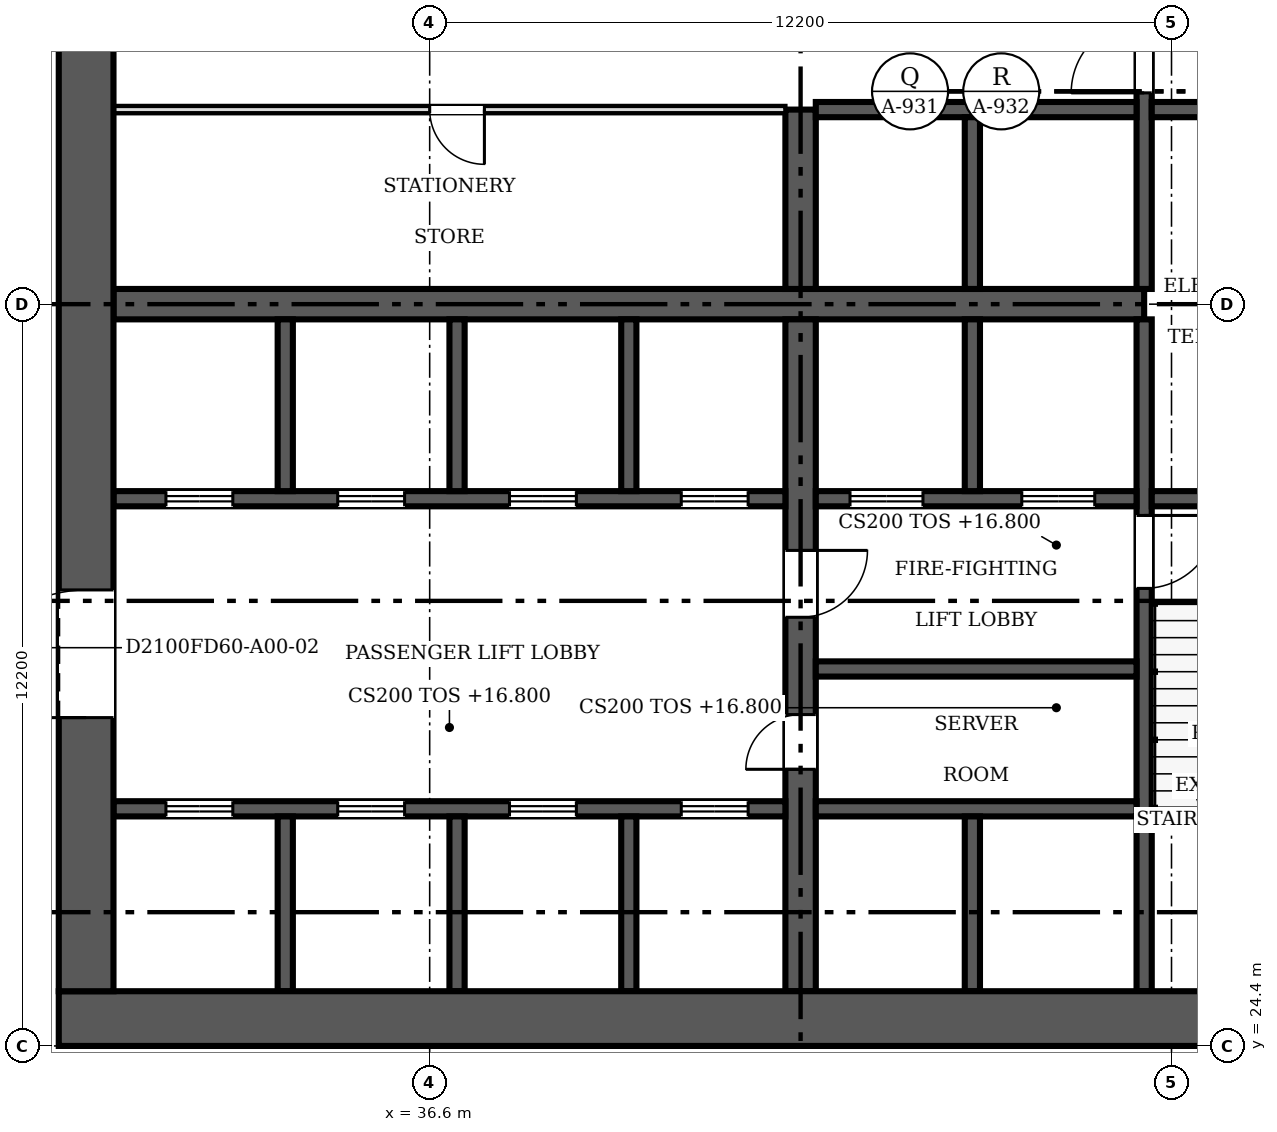
"""IFC4 building model, lengths in metres.
Left out: names, types, materials, properties, quantities, classifications, styles, units other than length and angle.
Written with IfcOpenShell. Run it as: python <this file> out.ifc"""

import sys

from ifc_helpers import new_model, si_unit, direction, frame, frame_2d, origin, place, context, subcontext, project, spatial, rectangle, extrude, source, transform, mapped, element, fill, save


model = new_model("IFC4")
c1 = context("Model", 3, precision=1e-05, world=origin(), true_north=direction((0.0, 1.0)))
c2 = subcontext(c1, "Body", "Model", "MODEL_VIEW")
j1 = project(units=[si_unit("LENGTHUNIT", "METRE"), si_unit("PLANEANGLEUNIT", "RADIAN")], contexts=[c1])
p1 = place(None, origin())
s1 = spatial("IfcSite", under=j1, at=p1, CompositionType="ELEMENT")
p2 = place(p1, origin())
s2 = spatial("IfcBuilding", under=s1, at=p2, CompositionType="ELEMENT")
p3 = place(p2, frame((0.0, 0.0, 16.8)))
s3 = spatial("IfcBuildingStorey", under=s2, at=p3, CompositionType="ELEMENT", Elevation=16.8)
p4 = place(p3, frame((54.9, 24.85, 0.0), z_axis=(0.0, 0.0, 1.0), x_axis=(-1.0, 0.0, 0.0)))
e1 = element("IfcWall", 1, at=p4, inside=s3, PredefinedType="SHEAR", context=c2, shape_type="SweptSolid", body=[
    extrude(rectangle(XDim=24.4, YDim=0.9, at=frame_2d((12.2, 0.0))), origin(), (0.0, 0.0, 1.0), 4.5),
])
m1 = source(origin(), c2, "Body", "SweptSolid", [
    extrude(rectangle(XDim=1.2, YDim=2.1, at=frame_2d((0.6, 1.05))), frame((0.0, 0.46, 0.0), z_axis=(0.0, -1.0, 0.0), x_axis=(1.0, 0.0, 0.0)), (0.0, 0.0, 1.0), 0.92),
])
p5 = place(p4, frame((1.5, 0.0, 0.0)))
e2 = element("IfcOpeningElement", 2, at=p5, cuts=e1, PredefinedType="OPENING", context=c2, shape_type="MappedRepresentation", body=[
    mapped(m1, transform((0.0, 0.0, 0.0), scale=1.0)),
])
p6 = place(p3, frame((30.95, 25.3, 0.0), z_axis=(0.0, 0.0, 1.0), x_axis=(0.0, 1.0, 0.0)))
e3 = element("IfcWall", 3, at=p6, inside=s3, PredefinedType="SHEAR", context=c2, shape_type="SweptSolid", body=[
    extrude(rectangle(XDim=22.6, YDim=0.9, at=frame_2d((11.3, 0.0))), origin(), (0.0, 0.0, 1.0), 4.5),
])
m2 = source(origin(), c2, "Body", "SweptSolid", [
    extrude(rectangle(XDim=2.1, YDim=2.4, at=frame_2d((1.05, 1.2))), frame((0.0, 0.46, 0.0), z_axis=(0.0, -1.0, 0.0), x_axis=(1.0, 0.0, 0.0)), (0.0, 0.0, 1.0), 0.92),
])
p7 = place(p6, frame((4.5, 0.0, 0.0)))
e4 = element("IfcOpeningElement", 4, at=p7, cuts=e3, PredefinedType="OPENING", context=c2, shape_type="MappedRepresentation", body=[
    mapped(m2, transform((0.0, 0.0, 0.0), scale=1.0)),
])
p8 = place(p6, frame((16.0, 0.0, 0.0)))
e5 = element("IfcOpeningElement", 5, at=p8, cuts=e3, PredefinedType="OPENING", context=c2, shape_type="MappedRepresentation", body=[
    mapped(m2, transform((0.0, 0.0, 0.0), scale=1.0)),
])
p9 = place(p3, frame((31.4, 36.6, 0.0), z_axis=(0.0, 0.0, 1.0), x_axis=(1.0, 0.0, 0.0)))
e6 = element("IfcWall", 6, at=p9, inside=s3, PredefinedType="SHEAR", context=c2, shape_type="SweptSolid", body=[
    extrude(rectangle(XDim=16.95, YDim=0.5, at=frame_2d((8.475, 0.0))), origin(), (0.0, 0.0, 1.0), 4.5),
])
p10 = place(p3, frame((42.7, 36.35, 0.0), z_axis=(0.0, 0.0, 1.0), x_axis=(0.0, -1.0, 0.0)))
e7 = element("IfcWall", 7, at=p10, inside=s3, PredefinedType="SHEAR", context=c2, shape_type="SweptSolid", body=[
    extrude(rectangle(XDim=11.05, YDim=0.5, at=frame_2d((5.525, 0.0))), origin(), (0.0, 0.0, 1.0), 4.5),
])
m3 = source(origin(), c2, "Body", "SweptSolid", [
    extrude(rectangle(XDim=0.9, YDim=2.1, at=frame_2d((0.45, 1.05))), frame((0.0, 0.26, 0.0), z_axis=(0.0, -1.0, 0.0), x_axis=(1.0, 0.0, 0.0)), (0.0, 0.0, 1.0), 0.52),
])
p11 = place(p10, frame((6.5, 0.0, 0.0)))
e8 = element("IfcOpeningElement", 8, at=p11, cuts=e7, PredefinedType="OPENING", context=c2, shape_type="MappedRepresentation", body=[
    mapped(m3, transform((0.0, 0.0, 0.0), scale=1.0)),
])
m4 = source(origin(), c2, "Body", "SweptSolid", [
    extrude(rectangle(XDim=1.1, YDim=2.1, at=frame_2d((0.55, 1.05))), frame((0.0, 0.26, 0.0), z_axis=(0.0, -1.0, 0.0), x_axis=(1.0, 0.0, 0.0)), (0.0, 0.0, 1.0), 0.52),
])
p12 = place(p10, frame((3.8, 0.0, 0.0)))
e9 = element("IfcOpeningElement", 9, at=p12, cuts=e7, PredefinedType="OPENING", context=c2, shape_type="MappedRepresentation", body=[
    mapped(m4, transform((0.0, 0.0, 0.0), scale=1.0)),
])
p13 = place(p3, frame((42.7, 36.85, 0.0), z_axis=(0.0, 0.0, 1.0), x_axis=(0.0, 1.0, 0.0)))
e10 = element("IfcWall", 10, at=p13, inside=s3, PredefinedType="SHEAR", context=c2, shape_type="SweptSolid", body=[
    extrude(rectangle(XDim=2.95, YDim=0.5, at=frame_2d((1.475, 0.0))), origin(), (0.0, 0.0, 1.0), 4.5),
])
p14 = place(p3, frame((48.35, 36.35, 0.0), z_axis=(0.0, 0.0, 1.0), x_axis=(0.0, -1.0, 0.0)))
e11 = element("IfcWall", 11, at=p14, inside=s3, PredefinedType="SOLIDWALL", context=c2, shape_type="SweptSolid", body=[
    extrude(rectangle(XDim=11.05, YDim=0.25, at=frame_2d((5.525, 0.0))), origin(), (0.0, 0.0, 1.0), 4.5),
])
m5 = source(origin(), c2, "Body", "SweptSolid", [
    extrude(rectangle(XDim=1.2, YDim=2.1, at=frame_2d((0.6, 1.05))), frame((0.0, 0.135, 0.0), z_axis=(0.0, -1.0, 0.0), x_axis=(1.0, 0.0, 0.0)), (0.0, 0.0, 1.0), 0.27),
])
p15 = place(p14, frame((3.225, 0.0, 0.0)))
e12 = element("IfcOpeningElement", 12, at=p15, cuts=e11, PredefinedType="OPENING", context=c2, shape_type="MappedRepresentation", body=[
    mapped(m5, transform((0.0, 0.0, 0.0), scale=1.0)),
])
p16 = place(p3, frame((48.35, 47.9, 0.0), z_axis=(0.0, 0.0, 1.0), x_axis=(0.0, -1.0, 0.0)))
e13 = element("IfcWall", 13, at=p16, inside=s3, PredefinedType="SOLIDWALL", context=c2, shape_type="SweptSolid", body=[
    extrude(rectangle(XDim=11.05, YDim=0.25, at=frame_2d((5.525, 0.0))), origin(), (0.0, 0.0, 1.0), 4.5),
])
p17 = place(p16, frame((6.625, 0.0, 0.0)))
e14 = element("IfcOpeningElement", 14, at=p17, cuts=e13, PredefinedType="OPENING", context=c2, shape_type="MappedRepresentation", body=[
    mapped(m5, transform((0.0, 0.0, 0.0), scale=1.0)),
])
p18 = place(p3, frame((42.45, 33.4, 0.0), z_axis=(0.0, 0.0, 1.0), x_axis=(-1.0, 0.0, 0.0)))
e15 = element("IfcWall", 15, at=p18, inside=s3, PredefinedType="SOLIDWALL", context=c2, shape_type="SweptSolid", body=[
    extrude(rectangle(XDim=11.05, YDim=0.25, at=frame_2d((5.525, 0.0))), origin(), (0.0, 0.0, 1.0), 4.5),
])
m6 = source(origin(), c2, "Body", "SweptSolid", [
    extrude(rectangle(XDim=1.1, YDim=2.1, at=frame_2d((0.55, 1.05))), frame((0.0, 0.135, 0.0), z_axis=(0.0, -1.0, 0.0), x_axis=(1.0, 0.0, 0.0)), (0.0, 0.0, 1.0), 0.27),
])
p19 = place(p18, frame((9.087, 0.0, 0.0)))
e16 = element("IfcOpeningElement", 16, at=p19, cuts=e15, PredefinedType="OPENING", context=c2, shape_type="MappedRepresentation", body=[
    mapped(m6, transform((0.0, 0.0, 0.0), scale=1.0)),
])
p20 = place(p18, frame((6.262, 0.0, 0.0)))
e17 = element("IfcOpeningElement", 17, at=p20, cuts=e15, PredefinedType="OPENING", context=c2, shape_type="MappedRepresentation", body=[
    mapped(m6, transform((0.0, 0.0, 0.0), scale=1.0)),
])
p21 = place(p18, frame((3.438, 0.0, 0.0)))
e18 = element("IfcOpeningElement", 18, at=p21, cuts=e15, PredefinedType="OPENING", context=c2, shape_type="MappedRepresentation", body=[
    mapped(m6, transform((0.0, 0.0, 0.0), scale=1.0)),
])
p22 = place(p18, frame((0.613, 0.0, 0.0)))
e19 = element("IfcOpeningElement", 19, at=p22, cuts=e15, PredefinedType="OPENING", context=c2, shape_type="MappedRepresentation", body=[
    mapped(m6, transform((0.0, 0.0, 0.0), scale=1.0)),
])
p23 = place(p3, frame((48.225, 33.4, 0.0), z_axis=(0.0, 0.0, 1.0), x_axis=(-1.0, 0.0, 0.0)))
e20 = element("IfcWall", 20, at=p23, inside=s3, PredefinedType="SOLIDWALL", context=c2, shape_type="SweptSolid", body=[
    extrude(rectangle(XDim=5.275, YDim=0.25, at=frame_2d((2.638, 0.0))), origin(), (0.0, 0.0, 1.0), 4.5),
])
p24 = place(p23, frame((3.512, 0.0, 0.0)))
e21 = element("IfcOpeningElement", 21, at=p24, cuts=e20, PredefinedType="OPENING", context=c2, shape_type="MappedRepresentation", body=[
    mapped(m5, transform((0.0, 0.0, 0.0), scale=1.0)),
])
p25 = place(p23, frame((0.688, 0.0, 0.0)))
e22 = element("IfcOpeningElement", 22, at=p25, cuts=e20, PredefinedType="OPENING", context=c2, shape_type="MappedRepresentation", body=[
    mapped(m5, transform((0.0, 0.0, 0.0), scale=1.0)),
])
p26 = place(p3, frame((48.475, 33.4, 0.0), z_axis=(0.0, 0.0, 1.0), x_axis=(1.0, 0.0, 0.0)))
e23 = element("IfcWall", 23, at=p26, inside=s3, PredefinedType="SOLIDWALL", context=c2, shape_type="SweptSolid", body=[
    extrude(rectangle(XDim=3.525, YDim=0.25, at=frame_2d((1.762, 0.0))), origin(), (0.0, 0.0, 1.0), 4.5),
])
p27 = place(p3, frame((31.4, 28.3, 0.0), z_axis=(0.0, 0.0, 1.0), x_axis=(1.0, 0.0, 0.0)))
e24 = element("IfcWall", 24, at=p27, inside=s3, PredefinedType="SOLIDWALL", context=c2, shape_type="SweptSolid", body=[
    extrude(rectangle(XDim=11.05, YDim=0.25, at=frame_2d((5.525, 0.0))), origin(), (0.0, 0.0, 1.0), 4.5),
])
p28 = place(p27, frame((0.863, 0.0, 0.0)))
e25 = element("IfcOpeningElement", 25, at=p28, cuts=e24, PredefinedType="OPENING", context=c2, shape_type="MappedRepresentation", body=[
    mapped(m6, transform((0.0, 0.0, 0.0), scale=1.0)),
])
p29 = place(p27, frame((3.688, 0.0, 0.0)))
e26 = element("IfcOpeningElement", 26, at=p29, cuts=e24, PredefinedType="OPENING", context=c2, shape_type="MappedRepresentation", body=[
    mapped(m6, transform((0.0, 0.0, 0.0), scale=1.0)),
])
p30 = place(p27, frame((6.512, 0.0, 0.0)))
e27 = element("IfcOpeningElement", 27, at=p30, cuts=e24, PredefinedType="OPENING", context=c2, shape_type="MappedRepresentation", body=[
    mapped(m6, transform((0.0, 0.0, 0.0), scale=1.0)),
])
p31 = place(p27, frame((9.337, 0.0, 0.0)))
e28 = element("IfcOpeningElement", 28, at=p31, cuts=e24, PredefinedType="OPENING", context=c2, shape_type="MappedRepresentation", body=[
    mapped(m6, transform((0.0, 0.0, 0.0), scale=1.0)),
])
for number, where, z_axis, x_axis in (
    (29, (42.95, 28.3, 0.0), (0.0, 0.0, 1.0), (1.0, 0.0, 0.0)),
    (30, (42.95, 39.8, 0.0), (0.0, 0.0, 1.0), (1.0, 0.0, 0.0)),
):
    element("IfcWall", number, at=place(p3, frame(where, z_axis=z_axis, x_axis=x_axis)), inside=s3, PredefinedType="SOLIDWALL", context=c2, shape_type="SweptSolid", body=[
        extrude(rectangle(XDim=5.275, YDim=0.25, at=frame_2d((2.638, 0.0))), origin(), (0.0, 0.0, 1.0), 4.5),
    ])
p32 = place(p3, frame((48.475, 39.8, 0.0), z_axis=(0.0, 0.0, 1.0), x_axis=(1.0, 0.0, 0.0)))
e31 = element("IfcWall", 31, at=p32, inside=s3, PredefinedType="SOLIDWALL", context=c2, shape_type="SweptSolid", body=[
    extrude(rectangle(XDim=3.525, YDim=0.25, at=frame_2d((1.762, 0.0))), origin(), (0.0, 0.0, 1.0), 4.5),
])
p33 = place(p3, frame((45.525, 33.525, 0.0), z_axis=(0.0, 0.0, 1.0), x_axis=(0.0, 1.0, 0.0)))
e32 = element("IfcWall", 32, at=p33, inside=s3, PredefinedType="SOLIDWALL", context=c2, shape_type="SweptSolid", body=[
    extrude(rectangle(XDim=2.825, YDim=0.25, at=frame_2d((1.413, 0.0))), origin(), (0.0, 0.0, 1.0), 4.5),
])
p34 = place(p3, frame((45.525, 36.85, 0.0), z_axis=(0.0, 0.0, 1.0), x_axis=(0.0, 1.0, 0.0)))
e33 = element("IfcWall", 33, at=p34, inside=s3, PredefinedType="SOLIDWALL", context=c2, shape_type="SweptSolid", body=[
    extrude(rectangle(XDim=2.825, YDim=0.25, at=frame_2d((1.413, 0.0))), origin(), (0.0, 0.0, 1.0), 4.5),
])
p35 = place(p3, frame((42.95, 30.6, 0.0), z_axis=(0.0, 0.0, 1.0), x_axis=(1.0, 0.0, 0.0)))
e34 = element("IfcWall", 34, at=p35, inside=s3, PredefinedType="SOLIDWALL", context=c2, shape_type="SweptSolid", body=[
    extrude(rectangle(XDim=5.275, YDim=0.25, at=frame_2d((2.638, 0.0))), origin(), (0.0, 0.0, 1.0), 4.5),
])
for number, where, z_axis, x_axis in (
    (35, (34.225, 33.525, 0.0), (0.0, 0.0, 1.0), (0.0, 1.0, 0.0)),
    (36, (37.05, 33.525, 0.0), (0.0, 0.0, 1.0), (0.0, 1.0, 0.0)),
    (37, (39.875, 33.525, 0.0), (0.0, 0.0, 1.0), (0.0, 1.0, 0.0)),
):
    element("IfcWall", number, at=place(p3, frame(where, z_axis=z_axis, x_axis=x_axis)), inside=s3, PredefinedType="SOLIDWALL", context=c2, shape_type="SweptSolid", body=[
        extrude(rectangle(XDim=2.825, YDim=0.25, at=frame_2d((1.413, 0.0))), origin(), (0.0, 0.0, 1.0), 4.5),
    ])
for number, where, z_axis, x_axis in (
    (38, (34.225, 25.3, 0.0), (0.0, 0.0, 1.0), (0.0, 1.0, 0.0)),
    (39, (37.05, 25.3, 0.0), (0.0, 0.0, 1.0), (0.0, 1.0, 0.0)),
    (40, (39.875, 25.3, 0.0), (0.0, 0.0, 1.0), (0.0, 1.0, 0.0)),
    (41, (45.525, 25.3, 0.0), (0.0, 0.0, 1.0), (0.0, 1.0, 0.0)),
):
    element("IfcWall", number, at=place(p3, frame(where, z_axis=z_axis, x_axis=x_axis)), inside=s3, PredefinedType="SOLIDWALL", context=c2, shape_type="SweptSolid", body=[
        extrude(rectangle(XDim=2.875, YDim=0.25, at=frame_2d((1.438, 0.0))), origin(), (0.0, 0.0, 1.0), 4.5),
    ])
p36 = place(p3, frame((42.45, 39.8, 0.0), z_axis=(0.0, 0.0, 1.0), x_axis=(-1.0, 0.0, 0.0)))
e42 = element("IfcWall", 42, at=p36, inside=s3, PredefinedType="PARTITIONING", context=c2, shape_type="SweptSolid", body=[
    extrude(rectangle(XDim=11.05, YDim=0.12, at=frame_2d((5.525, 0.0))), origin(), (0.0, 0.0, 1.0), 4.3),
])
m7 = source(origin(), c2, "Body", "SweptSolid", [
    extrude(rectangle(XDim=0.9, YDim=2.1, at=frame_2d((0.45, 1.05))), frame((0.0, 0.07, 0.0), z_axis=(0.0, -1.0, 0.0), x_axis=(1.0, 0.0, 0.0)), (0.0, 0.0, 1.0), 0.14),
])
p37 = place(p36, frame((4.95, 0.0, 0.0)))
e43 = element("IfcOpeningElement", 43, at=p37, cuts=e42, PredefinedType="OPENING", context=c2, shape_type="MappedRepresentation", body=[
    mapped(m7, transform((0.0, 0.0, 0.0), scale=1.0)),
])
m8 = source(origin(), c2, "Body", "SweptSolid", [
    extrude(rectangle(XDim=2.1, YDim=2.4, at=frame_2d((1.05, 1.2))), frame((0.0, 0.025, 0.0), z_axis=(0.0, -1.0, 0.0), x_axis=(1.0, 0.0, 0.0)), (0.0, 0.0, 1.0), 0.05),
])
p38 = place(p7, origin())
e44 = element("IfcDoor", 44, at=p38, inside=s3, OperationType="DOUBLE_DOOR_SINGLE_SWING", PredefinedType="DOOR", context=c2, shape_type="MappedRepresentation", body=[
    mapped(m8, transform((0.0, 0.0, 0.0), scale=1.0)),
])
fill(e4, e44)
m9 = source(origin(), c2, "Body", "SweptSolid", [
    extrude(rectangle(XDim=0.9, YDim=2.1, at=frame_2d((0.45, 1.05))), frame((0.0, 0.025, 0.0), z_axis=(0.0, -1.0, 0.0), x_axis=(1.0, 0.0, 0.0)), (0.0, 0.0, 1.0), 0.05),
])
p39 = place(p11, origin())
e45 = element("IfcDoor", 45, at=p39, inside=s3, OperationType="SINGLE_SWING_RIGHT", PredefinedType="DOOR", context=c2, shape_type="MappedRepresentation", body=[
    mapped(m9, transform((0.0, 0.0, 0.0), scale=1.0)),
])
fill(e8, e45)
m10 = source(origin(), c2, "Body", "SweptSolid", [
    extrude(rectangle(XDim=1.1, YDim=2.1, at=frame_2d((0.55, 1.05))), frame((0.0, 0.025, 0.0), z_axis=(0.0, -1.0, 0.0), x_axis=(1.0, 0.0, 0.0)), (0.0, 0.0, 1.0), 0.05),
])
p40 = place(p12, origin())
e46 = element("IfcDoor", 46, at=p40, inside=s3, OperationType="SINGLE_SWING_LEFT", PredefinedType="DOOR", context=c2, shape_type="MappedRepresentation", body=[
    mapped(m10, transform((0.0, 0.0, 0.0), scale=1.0)),
])
fill(e9, e46)
m11 = source(origin(), c2, "Body", "SweptSolid", [
    extrude(rectangle(XDim=1.2, YDim=2.1, at=frame_2d((0.6, 1.05))), frame((0.0, 0.025, 0.0), z_axis=(0.0, -1.0, 0.0), x_axis=(1.0, 0.0, 0.0)), (0.0, 0.0, 1.0), 0.05),
])
p41 = place(p15, origin())
e47 = element("IfcDoor", 47, at=p41, inside=s3, OperationType="SINGLE_SWING_LEFT", PredefinedType="DOOR", context=c2, shape_type="MappedRepresentation", body=[
    mapped(m11, transform((0.0, 0.0, 0.0), scale=1.0)),
])
fill(e12, e47)
p42 = place(p17, origin())
e48 = element("IfcDoor", 48, at=p42, inside=s3, OperationType="SINGLE_SWING_RIGHT", PredefinedType="DOOR", context=c2, shape_type="MappedRepresentation", body=[
    mapped(m11, transform((0.0, 0.0, 0.0), scale=1.0)),
])
fill(e14, e48)
p43 = place(p19, origin())
e49 = element("IfcDoor", 49, at=p43, inside=s3, OperationType="DOUBLE_DOOR_SLIDING", PredefinedType="DOOR", context=c2, shape_type="MappedRepresentation", body=[
    mapped(m10, transform((0.0, 0.0, 0.0), scale=1.0)),
])
fill(e16, e49)
p44 = place(p20, origin())
e50 = element("IfcDoor", 50, at=p44, inside=s3, OperationType="DOUBLE_DOOR_SLIDING", PredefinedType="DOOR", context=c2, shape_type="MappedRepresentation", body=[
    mapped(m10, transform((0.0, 0.0, 0.0), scale=1.0)),
])
fill(e17, e50)
p45 = place(p21, origin())
e51 = element("IfcDoor", 51, at=p45, inside=s3, OperationType="DOUBLE_DOOR_SLIDING", PredefinedType="DOOR", context=c2, shape_type="MappedRepresentation", body=[
    mapped(m10, transform((0.0, 0.0, 0.0), scale=1.0)),
])
fill(e18, e51)
p46 = place(p22, origin())
e52 = element("IfcDoor", 52, at=p46, inside=s3, OperationType="DOUBLE_DOOR_SLIDING", PredefinedType="DOOR", context=c2, shape_type="MappedRepresentation", body=[
    mapped(m10, transform((0.0, 0.0, 0.0), scale=1.0)),
])
fill(e19, e52)
p47 = place(p24, origin())
e53 = element("IfcDoor", 53, at=p47, inside=s3, OperationType="DOUBLE_DOOR_SLIDING", PredefinedType="DOOR", context=c2, shape_type="MappedRepresentation", body=[
    mapped(m11, transform((0.0, 0.0, 0.0), scale=1.0)),
])
fill(e21, e53)
p48 = place(p25, origin())
e54 = element("IfcDoor", 54, at=p48, inside=s3, OperationType="DOUBLE_DOOR_SLIDING", PredefinedType="DOOR", context=c2, shape_type="MappedRepresentation", body=[
    mapped(m11, transform((0.0, 0.0, 0.0), scale=1.0)),
])
fill(e22, e54)
p49 = place(p28, origin())
e55 = element("IfcDoor", 55, at=p49, inside=s3, OperationType="DOUBLE_DOOR_SLIDING", PredefinedType="DOOR", context=c2, shape_type="MappedRepresentation", body=[
    mapped(m10, transform((0.0, 0.0, 0.0), scale=1.0)),
])
fill(e25, e55)
p50 = place(p29, origin())
e56 = element("IfcDoor", 56, at=p50, inside=s3, OperationType="DOUBLE_DOOR_SLIDING", PredefinedType="DOOR", context=c2, shape_type="MappedRepresentation", body=[
    mapped(m10, transform((0.0, 0.0, 0.0), scale=1.0)),
])
fill(e26, e56)
p51 = place(p30, origin())
e57 = element("IfcDoor", 57, at=p51, inside=s3, OperationType="DOUBLE_DOOR_SLIDING", PredefinedType="DOOR", context=c2, shape_type="MappedRepresentation", body=[
    mapped(m10, transform((0.0, 0.0, 0.0), scale=1.0)),
])
fill(e27, e57)
p52 = place(p31, origin())
e58 = element("IfcDoor", 58, at=p52, inside=s3, OperationType="DOUBLE_DOOR_SLIDING", PredefinedType="DOOR", context=c2, shape_type="MappedRepresentation", body=[
    mapped(m10, transform((0.0, 0.0, 0.0), scale=1.0)),
])
fill(e28, e58)
p53 = place(p37, origin())
e59 = element("IfcDoor", 59, at=p53, inside=s3, OperationType="SINGLE_SWING_LEFT", PredefinedType="DOOR", context=c2, shape_type="MappedRepresentation", body=[
    mapped(m9, transform((0.0, 0.0, 0.0), scale=1.0)),
])
fill(e43, e59)
save(model, sys.argv[1])
